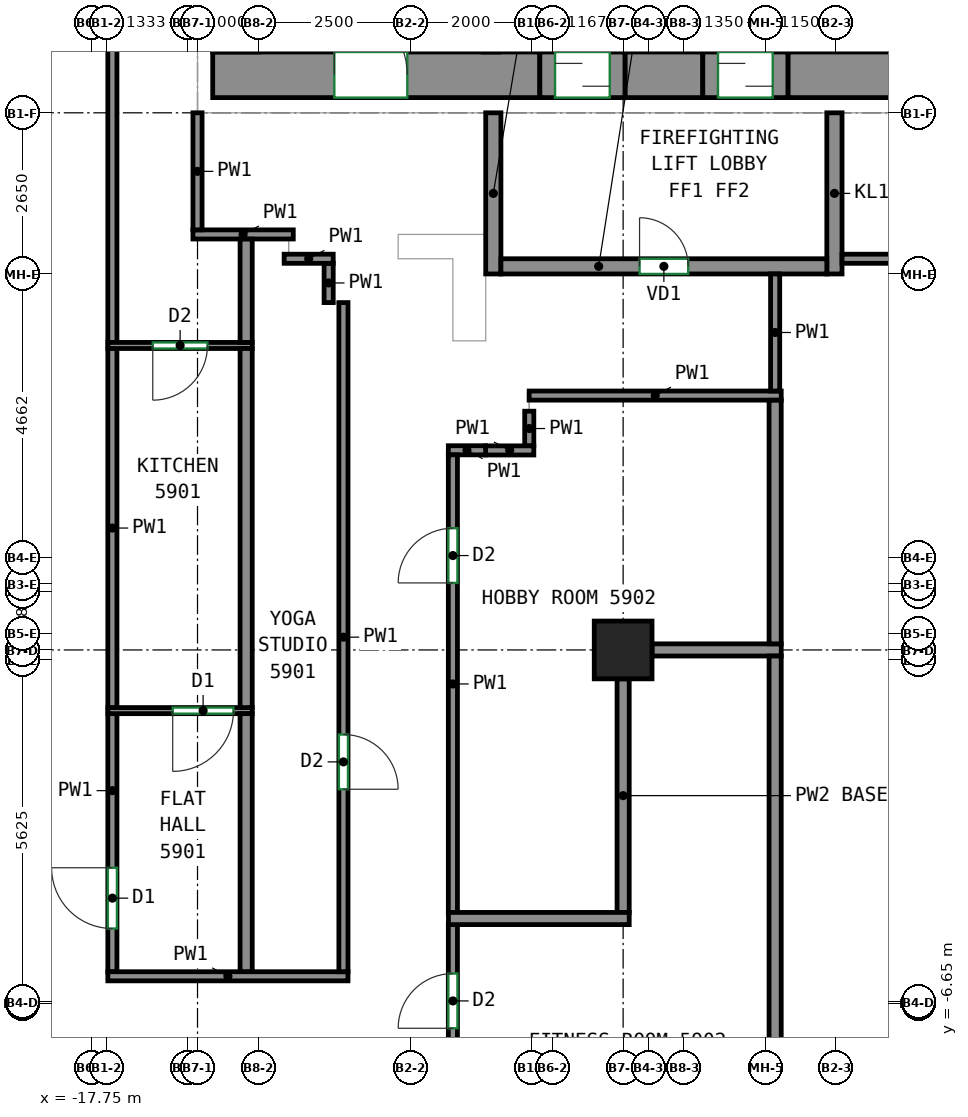
"""IFC4 building model, lengths in metres.
Left out: names, types, materials, properties, quantities, classifications, styles, units other than length and angle.
Written with IfcOpenShell. Run it as: python <this file> out.ifc"""

import sys

from ifc_helpers import new_model, si_unit, direction, frame, frame_2d, origin, origin_2d, place, context, subcontext, project, spatial, rectangle, extrude, source, transform, mapped, element, fill, save


model = new_model("IFC4")
c1 = context("Model", 3, precision=1e-05, world=origin(), true_north=direction((0.0, 1.0)))
c2 = subcontext(c1, "Body", "Model", "MODEL_VIEW")
j1 = project(units=[si_unit("LENGTHUNIT", "METRE"), si_unit("PLANEANGLEUNIT", "RADIAN")], contexts=[c1])
p1 = place(None, origin())
s1 = spatial("IfcSite", under=j1, at=p1, CompositionType="ELEMENT")
p2 = place(p1, origin())
s2 = spatial("IfcBuilding", under=s1, at=p2, CompositionType="ELEMENT")
p3 = place(p2, frame((0.0, 0.0, 245.8)))
s3 = spatial("IfcBuildingStorey", under=s2, at=p3, CompositionType="ELEMENT", Elevation=245.8)
m1 = source(origin(), c2, "Body", "SweptSolid", [
    extrude(rectangle(XDim=0.95, YDim=0.95, at=origin_2d()), origin(), (0.0, 0.0, 1.0), 3.12),
])
p4 = place(p3, frame((-9.0, -0.833, 0.0), z_axis=(0.0, 0.0, 1.0), x_axis=(1.0, 0.0, 0.0)))
e1 = element("IfcColumn", 1, at=p4, inside=s3, PredefinedType="COLUMN", context=c2, shape_type="MappedRepresentation", body=[
    mapped(m1, transform((0.0, 0.0, 0.0))),
])
m2 = source(origin(), c2, "Body", "SweptSolid", [
    extrude(rectangle(XDim=5.38, YDim=0.75, at=frame_2d((2.69, 0.0))), origin(), (0.0, 0.0, 1.0), 3.12),
])
p5 = place(p3, frame((-15.75, 8.625, 0.0), z_axis=(0.0, 0.0, 1.0), x_axis=(1.0, 0.0, 0.0)))
e2 = element("IfcWall", 2, at=p5, inside=s3, PredefinedType="SHEAR", context=c2, shape_type="MappedRepresentation", body=[
    mapped(m2, transform((0.0, 0.0, 0.0))),
])
p6 = place(p5, frame((2.0, 0.0, 0.0)))
e3 = element("IfcOpeningElement", 3, at=p6, cuts=e2, PredefinedType="OPENING", context=c2, shape_type="SweptSolid", body=[
    extrude(rectangle(XDim=1.2, YDim=2.1, at=frame_2d((0.6, 1.05))), frame((0.0, 0.385, 0.0), z_axis=(0.0, -1.0, 0.0), x_axis=(1.0, 0.0, 0.0)), (0.0, 0.0, 1.0), 0.77),
])
m3 = source(origin(), c2, "Body", "SweptSolid", [
    extrude(rectangle(XDim=1.28, YDim=0.75, at=frame_2d((0.64, 0.0))), origin(), (0.0, 0.0, 1.0), 3.12),
])
p7 = place(p3, frame((-8.97, 8.625, 0.0), z_axis=(0.0, 0.0, 1.0), x_axis=(1.0, 0.0, 0.0)))
e4 = element("IfcWall", 4, at=p7, inside=s3, PredefinedType="SHEAR", context=c2, shape_type="MappedRepresentation", body=[
    mapped(m3, transform((0.0, 0.0, 0.0))),
])
m4 = source(origin(), c2, "Body", "SweptSolid", [
    extrude(rectangle(XDim=14.18, YDim=0.75, at=frame_2d((7.09, 0.0))), origin(), (0.0, 0.0, 1.0), 3.12),
])
p8 = place(p3, frame((-6.29, 8.625, 0.0), z_axis=(0.0, 0.0, 1.0), x_axis=(1.0, 0.0, 0.0)))
e5 = element("IfcWall", 5, at=p8, inside=s3, PredefinedType="SHEAR", context=c2, shape_type="MappedRepresentation", body=[
    mapped(m4, transform((0.0, 0.0, 0.0))),
])
m5 = source(origin(), c2, "Body", "SweptSolid", [
    extrude(rectangle(XDim=2.65, YDim=0.25, at=frame_2d((1.325, 0.0))), origin(), (0.0, 0.0, 1.0), 2.57),
])
for number, where, z_axis, x_axis in (
    (6, (-11.135, 5.35, 0.0), (0.0, 0.0, 1.0), (0.0, 1.0, 0.0)),
    (7, (-5.525, 5.35, 0.0), (0.0, 0.0, 1.0), (0.0, 1.0, 0.0)),
):
    element("IfcWall", number, at=place(p3, frame(where, z_axis=z_axis, x_axis=x_axis)), inside=s3, PredefinedType="PARTITIONING", context=c2, shape_type="MappedRepresentation", body=[
        mapped(m5, transform((0.0, 0.0, 0.0))),
    ])
m6 = source(origin(), c2, "Body", "SweptSolid", [
    extrude(rectangle(XDim=5.36, YDim=0.25, at=frame_2d((2.68, 0.0))), origin(), (0.0, 0.0, 1.0), 3.12),
])
p9 = place(p3, frame((-11.01, 5.475, 0.0), z_axis=(0.0, 0.0, 1.0), x_axis=(1.0, 0.0, 0.0)))
e8 = element("IfcWall", 8, at=p9, inside=s3, PredefinedType="PARTITIONING", context=c2, shape_type="MappedRepresentation", body=[
    mapped(m6, transform((0.0, 0.0, 0.0))),
])
p10 = place(p9, frame((2.28, 0.0, 0.0)))
e9 = element("IfcOpeningElement", 9, at=p10, cuts=e8, PredefinedType="OPENING", context=c2, shape_type="SweptSolid", body=[
    extrude(rectangle(XDim=0.8, YDim=2.0, at=frame_2d((0.4, 1.0))), frame((0.0, 0.135, 0.0), z_axis=(0.0, -1.0, 0.0), x_axis=(1.0, 0.0, 0.0)), (0.0, 0.0, 1.0), 0.27),
])
m7 = source(origin(), c2, "Body", "SweptSolid", [
    extrude(rectangle(XDim=1.4, YDim=0.75, at=frame_2d((0.7, 0.0))), origin(), (0.0, 0.0, 1.0), 2.7),
])
p11 = place(p3, frame((-10.37, 8.625, 0.0), z_axis=(0.0, 0.0, 1.0), x_axis=(1.0, 0.0, 0.0)))
e10 = element("IfcWall", 10, at=p11, inside=s3, PredefinedType="PARTITIONING", context=c2, shape_type="MappedRepresentation", body=[
    mapped(m7, transform((0.0, 0.0, 0.0))),
])
p12 = place(p11, frame((0.25, 0.0, 0.0)))
e11 = element("IfcOpeningElement", 11, at=p12, cuts=e10, PredefinedType="OPENING", context=c2, shape_type="SweptSolid", body=[
    extrude(rectangle(XDim=0.9, YDim=2.1, at=frame_2d((0.45, 1.05))), frame((0.0, 0.385, 0.0), z_axis=(0.0, -1.0, 0.0), x_axis=(1.0, 0.0, 0.0)), (0.0, 0.0, 1.0), 0.77),
])
m8 = source(origin(), c2, "Body", "SweptSolid", [
    extrude(rectangle(XDim=1.4, YDim=0.75, at=frame_2d((0.7, 0.0))), origin(), (0.0, 0.0, 1.0), 2.7),
])
p13 = place(p3, frame((-7.69, 8.625, 0.0), z_axis=(0.0, 0.0, 1.0), x_axis=(1.0, 0.0, 0.0)))
e12 = element("IfcWall", 12, at=p13, inside=s3, PredefinedType="PARTITIONING", context=c2, shape_type="MappedRepresentation", body=[
    mapped(m8, transform((0.0, 0.0, 0.0))),
])
p14 = place(p13, frame((0.25, 0.0, 0.0)))
e13 = element("IfcOpeningElement", 13, at=p14, cuts=e12, PredefinedType="OPENING", context=c2, shape_type="SweptSolid", body=[
    extrude(rectangle(XDim=0.9, YDim=2.1, at=frame_2d((0.45, 1.05))), frame((0.0, 0.385, 0.0), z_axis=(0.0, -1.0, 0.0), x_axis=(1.0, 0.0, 0.0)), (0.0, 0.0, 1.0), 0.77),
])
p15 = place(p3, frame((-17.4, -6.125, 0.0), z_axis=(0.0, 0.0, 1.0), x_axis=(0.0, 1.0, 0.0)))
e14 = element("IfcWall", 14, at=p15, inside=s3, PredefinedType="PARTITIONING", context=c2, shape_type="SweptSolid", body=[
    extrude(rectangle(XDim=4.254, YDim=0.15, at=frame_2d((2.127, 0.0))), origin(), (0.0, 0.0, 1.0), 3.12),
])
p16 = place(p15, frame((0.71, 0.0, 0.0)))
e15 = element("IfcOpeningElement", 15, at=p16, cuts=e14, PredefinedType="OPENING", context=c2, shape_type="SweptSolid", body=[
    extrude(rectangle(XDim=1.0, YDim=2.1, at=frame_2d((0.5, 1.05))), frame((0.0, 0.085, 0.0), z_axis=(0.0, -1.0, 0.0), x_axis=(1.0, 0.0, 0.0)), (0.0, 0.0, 1.0), 0.17),
])
p17 = place(p3, frame((-17.475, -6.2, 0.0), z_axis=(0.0, 0.0, 1.0), x_axis=(1.0, 0.0, 0.0)))
e16 = element("IfcWall", 16, at=p17, inside=s3, PredefinedType="PARTITIONING", context=c2, shape_type="SweptSolid", body=[
    extrude(rectangle(XDim=3.95, YDim=0.15, at=frame_2d((1.975, 0.0))), origin(), (0.0, 0.0, 1.0), 3.12),
])
p18 = place(p3, frame((-17.4, -1.791, 0.0), z_axis=(0.0, 0.0, 1.0), x_axis=(0.0, 1.0, 0.0)))
e17 = element("IfcWall", 17, at=p18, inside=s3, PredefinedType="PARTITIONING", context=c2, shape_type="SweptSolid", body=[
    extrude(rectangle(XDim=5.925, YDim=0.15, at=frame_2d((2.962, 0.0))), origin(), (0.0, 0.0, 1.0), 3.12),
])
p19 = place(p3, frame((-17.4, 4.214, 0.0), z_axis=(0.0, 0.0, 1.0), x_axis=(0.0, 1.0, 0.0)))
e18 = element("IfcWall", 18, at=p19, inside=s3, PredefinedType="PARTITIONING", context=c2, shape_type="SweptSolid", body=[
    extrude(rectangle(XDim=12.477, YDim=0.15, at=frame_2d((6.238, 0.0))), origin(), (0.0, 0.0, 1.0), 3.12),
])
p20 = place(p3, frame((-16.075, 6.0, 0.0), z_axis=(0.0, 0.0, 1.0), x_axis=(1.0, 0.0, 0.0)))
e19 = element("IfcWall", 19, at=p20, inside=s3, PredefinedType="PARTITIONING", context=c2, shape_type="SweptSolid", body=[
    extrude(rectangle(XDim=1.65, YDim=0.15, at=frame_2d((0.825, 0.0))), origin(), (0.0, 0.0, 1.0), 3.12),
])
p21 = place(p3, frame((-16.0, 6.075, 0.0), z_axis=(0.0, 0.0, 1.0), x_axis=(0.0, 1.0, 0.0)))
e20 = element("IfcWall", 20, at=p21, inside=s3, PredefinedType="PARTITIONING", context=c2, shape_type="SweptSolid", body=[
    extrude(rectangle(XDim=1.925, YDim=0.15, at=frame_2d((0.962, 0.0))), origin(), (0.0, 0.0, 1.0), 3.12),
])
p22 = place(p3, frame((-13.6, 4.879, 0.0), z_axis=(0.0, 0.0, 1.0), x_axis=(0.0, -1.0, 0.0)))
e21 = element("IfcWall", 21, at=p22, inside=s3, PredefinedType="PARTITIONING", context=c2, shape_type="SweptSolid", body=[
    extrude(rectangle(XDim=11.004, YDim=0.15, at=frame_2d((5.502, 0.0))), origin(), (0.0, 0.0, 1.0), 3.12),
])
p23 = place(p22, frame((7.103, 0.0, 0.0)))
e22 = element("IfcOpeningElement", 22, at=p23, cuts=e21, PredefinedType="OPENING", context=c2, shape_type="SweptSolid", body=[
    extrude(rectangle(XDim=0.9, YDim=2.1, at=frame_2d((0.45, 1.05))), frame((0.0, 0.085, 0.0), z_axis=(0.0, -1.0, 0.0), x_axis=(1.0, 0.0, 0.0)), (0.0, 0.0, 1.0), 0.17),
])
p24 = place(p3, frame((-13.843, 5.525, 0.0), z_axis=(0.0, 0.0, 1.0), x_axis=(0.0, -1.0, 0.0)))
e23 = element("IfcWall", 23, at=p24, inside=s3, PredefinedType="PARTITIONING", context=c2, shape_type="SweptSolid", body=[
    extrude(rectangle(XDim=0.646, YDim=0.15, at=frame_2d((0.323, 0.0))), origin(), (0.0, 0.0, 1.0), 3.12),
])
p25 = place(p3, frame((-14.575, 5.6, 0.0), z_axis=(0.0, 0.0, 1.0), x_axis=(1.0, 0.0, 0.0)))
e24 = element("IfcWall", 24, at=p25, inside=s3, PredefinedType="PARTITIONING", context=c2, shape_type="SweptSolid", body=[
    extrude(rectangle(XDim=0.807, YDim=0.15, at=frame_2d((0.403, 0.0))), origin(), (0.0, 0.0, 1.0), 3.12),
])
p26 = place(p3, frame((-10.546, 3.35, 0.0), z_axis=(0.0, 0.0, 1.0), x_axis=(1.0, 0.0, 0.0)))
e25 = element("IfcWall", 25, at=p26, inside=s3, PredefinedType="PARTITIONING", context=c2, shape_type="SweptSolid", body=[
    extrude(rectangle(XDim=4.146, YDim=0.15, at=frame_2d((2.073, 0.0))), origin(), (0.0, 0.0, 1.0), 3.12),
])
p27 = place(p3, frame((-10.544, 2.523, 0.0), z_axis=(0.0, 0.0, 1.0), x_axis=(0.0, 1.0, 0.0)))
e26 = element("IfcWall", 26, at=p27, inside=s3, PredefinedType="PARTITIONING", context=c2, shape_type="SweptSolid", body=[
    extrude(rectangle(XDim=0.57, YDim=0.15, at=frame_2d((0.285, 0.0))), origin(), (0.0, 0.0, 1.0), 3.12),
])
p28 = place(p3, frame((-11.262, 2.448, 0.0), z_axis=(0.0, 0.0, 1.0), x_axis=(1.0, 0.0, 0.0)))
e27 = element("IfcWall", 27, at=p28, inside=s3, PredefinedType="PARTITIONING", context=c2, shape_type="SweptSolid", body=[
    extrude(rectangle(XDim=0.793, YDim=0.15, at=frame_2d((0.396, 0.0))), origin(), (0.0, 0.0, 1.0), 3.12),
])
p29 = place(p3, frame((-11.875, 2.45, 0.0), z_axis=(0.0, 0.0, 1.0), x_axis=(1.0, 0.0, 0.0)))
e28 = element("IfcWall", 28, at=p29, inside=s3, PredefinedType="PARTITIONING", context=c2, shape_type="SweptSolid", body=[
    extrude(rectangle(XDim=0.613, YDim=0.15, at=frame_2d((0.307, 0.0))), origin(), (0.0, 0.0, 1.0), 3.12),
])
p30 = place(p3, frame((-11.8, -5.16, 0.0), z_axis=(0.0, 0.0, 1.0), x_axis=(0.0, 1.0, 0.0)))
e29 = element("IfcWall", 29, at=p30, inside=s3, PredefinedType="PARTITIONING", context=c2, shape_type="SweptSolid", body=[
    extrude(rectangle(XDim=7.535, YDim=0.15, at=frame_2d((3.768, 0.0))), origin(), (0.0, 0.0, 1.0), 3.12),
])
p31 = place(p30, frame((5.429, 0.0, 0.0)))
e30 = element("IfcOpeningElement", 30, at=p31, cuts=e29, PredefinedType="OPENING", context=c2, shape_type="SweptSolid", body=[
    extrude(rectangle(XDim=0.9, YDim=2.1, at=frame_2d((0.45, 1.05))), frame((0.0, 0.085, 0.0), z_axis=(0.0, -1.0, 0.0), x_axis=(1.0, 0.0, 0.0)), (0.0, 0.0, 1.0), 0.17),
])
p32 = place(p3, frame((-11.8, -10.125, 0.0), z_axis=(0.0, 0.0, 1.0), x_axis=(0.0, 1.0, 0.0)))
e31 = element("IfcWall", 31, at=p32, inside=s3, PredefinedType="PARTITIONING", context=c2, shape_type="SweptSolid", body=[
    extrude(rectangle(XDim=4.785, YDim=0.15, at=frame_2d((2.393, 0.0))), origin(), (0.0, 0.0, 1.0), 3.12),
])
p33 = place(p32, frame((3.07, 0.0, 0.0)))
e32 = element("IfcOpeningElement", 32, at=p33, cuts=e31, PredefinedType="OPENING", context=c2, shape_type="SweptSolid", body=[
    extrude(rectangle(XDim=0.9, YDim=2.1, at=frame_2d((0.45, 1.05))), frame((0.0, 0.085, 0.0), z_axis=(0.0, -1.0, 0.0), x_axis=(1.0, 0.0, 0.0)), (0.0, 0.0, 1.0), 0.17),
])
p34 = place(p3, frame((-6.5, 3.425, 0.0), z_axis=(0.0, 0.0, 1.0), x_axis=(0.0, 1.0, 0.0)))
e33 = element("IfcWall", 33, at=p34, inside=s3, PredefinedType="PARTITIONING", context=c2, shape_type="SweptSolid", body=[
    extrude(rectangle(XDim=1.925, YDim=0.15, at=frame_2d((0.962, 0.0))), origin(), (0.0, 0.0, 1.0), 3.12),
])
p35 = place(p3, frame((-5.4, 5.6, 0.0), z_axis=(0.0, 0.0, 1.0), x_axis=(1.0, 0.0, 0.0)))
e34 = element("IfcWall", 34, at=p35, inside=s3, PredefinedType="PARTITIONING", context=c2, shape_type="SweptSolid", body=[
    extrude(rectangle(XDim=13.975, YDim=0.15, at=frame_2d((6.987, 0.0))), origin(), (0.0, 0.0, 1.0), 3.12),
])
p36 = place(p3, frame((-15.1, -1.831, 0.0), z_axis=(0.0, 0.0, 1.0), x_axis=(-1.0, 0.0, 0.0)))
e35 = element("IfcWall", 35, at=p36, inside=s3, PredefinedType="PARTITIONING", context=c2, shape_type="SweptSolid", body=[
    extrude(rectangle(XDim=2.373, YDim=0.1, at=frame_2d((1.187, 0.0))), origin(), (0.0, 0.0, 1.0), 3.12),
])
p37 = place(p36, frame((0.308, 0.0, 0.0)))
e36 = element("IfcOpeningElement", 36, at=p37, cuts=e35, PredefinedType="OPENING", context=c2, shape_type="SweptSolid", body=[
    extrude(rectangle(XDim=1.0, YDim=2.1, at=frame_2d((0.5, 1.05))), frame((0.0, 0.06, 0.0), z_axis=(0.0, -1.0, 0.0), x_axis=(1.0, 0.0, 0.0)), (0.0, 0.0, 1.0), 0.12),
])
p38 = place(p3, frame((-15.2, -6.123, 0.0), z_axis=(0.0, 0.0, 1.0), x_axis=(0.0, 1.0, 0.0)))
e37 = element("IfcWall", 37, at=p38, inside=s3, PredefinedType="PARTITIONING", context=c2, shape_type="SweptSolid", body=[
    extrude(rectangle(XDim=4.242, YDim=0.2, at=frame_2d((2.121, 0.0))), origin(), (0.0, 0.0, 1.0), 3.12),
])
p39 = place(p3, frame((-15.1, 4.174, 0.0), z_axis=(0.0, 0.0, 1.0), x_axis=(-1.0, 0.0, 0.0)))
e38 = element("IfcWall", 38, at=p39, inside=s3, PredefinedType="PARTITIONING", context=c2, shape_type="SweptSolid", body=[
    extrude(rectangle(XDim=2.373, YDim=0.1, at=frame_2d((1.187, 0.0))), origin(), (0.0, 0.0, 1.0), 3.12),
])
p40 = place(p39, frame((0.736, 0.0, 0.0)))
e39 = element("IfcOpeningElement", 39, at=p40, cuts=e38, PredefinedType="OPENING", context=c2, shape_type="SweptSolid", body=[
    extrude(rectangle(XDim=0.9, YDim=2.1, at=frame_2d((0.45, 1.05))), frame((0.0, 0.06, 0.0), z_axis=(0.0, -1.0, 0.0), x_axis=(1.0, 0.0, 0.0)), (0.0, 0.0, 1.0), 0.12),
])
p41 = place(p3, frame((-15.2, -1.781, 0.0), z_axis=(0.0, 0.0, 1.0), x_axis=(0.0, 1.0, 0.0)))
e40 = element("IfcWall", 40, at=p41, inside=s3, PredefinedType="PARTITIONING", context=c2, shape_type="SweptSolid", body=[
    extrude(rectangle(XDim=5.905, YDim=0.2, at=frame_2d((2.953, 0.0))), origin(), (0.0, 0.0, 1.0), 3.12),
])
p42 = place(p3, frame((-15.2, 4.224, 0.0), z_axis=(0.0, 0.0, 1.0), x_axis=(0.0, 1.0, 0.0)))
e41 = element("IfcWall", 41, at=p42, inside=s3, PredefinedType="PARTITIONING", context=c2, shape_type="SweptSolid", body=[
    extrude(rectangle(XDim=1.699, YDim=0.2, at=frame_2d((0.85, 0.0))), origin(), (0.0, 0.0, 1.0), 3.12),
])
p43 = place(p3, frame((-8.525, -0.833, 0.0), z_axis=(0.0, 0.0, 1.0), x_axis=(1.0, 0.0, 0.0)))
e42 = element("IfcWall", 42, at=p43, inside=s3, PredefinedType="PARTITIONING", context=c2, shape_type="SweptSolid", body=[
    extrude(rectangle(XDim=2.125, YDim=0.2, at=frame_2d((1.062, 0.0))), origin(), (0.0, 0.0, 1.0), 3.12),
])
p44 = place(p3, frame((-9.0, -5.15, 0.0), z_axis=(0.0, 0.0, 1.0), x_axis=(0.0, 1.0, 0.0)))
e43 = element("IfcWall", 43, at=p44, inside=s3, PredefinedType="PARTITIONING", context=c2, shape_type="SweptSolid", body=[
    extrude(rectangle(XDim=3.842, YDim=0.2, at=frame_2d((1.921, 0.0))), origin(), (0.0, 0.0, 1.0), 2.57),
])
p45 = place(p3, frame((-11.873, -5.25, 0.0), z_axis=(0.0, 0.0, 1.0), x_axis=(1.0, 0.0, 0.0)))
e44 = element("IfcWall", 44, at=p45, inside=s3, PredefinedType="PARTITIONING", context=c2, shape_type="SweptSolid", body=[
    extrude(rectangle(XDim=2.973, YDim=0.2, at=frame_2d((1.487, 0.0))), origin(), (0.0, 0.0, 1.0), 3.12),
])
p46 = place(p3, frame((-6.5, -0.733, 0.0), z_axis=(0.0, 0.0, 1.0), x_axis=(0.0, 1.0, 0.0)))
e45 = element("IfcWall", 45, at=p46, inside=s3, PredefinedType="PARTITIONING", context=c2, shape_type="SweptSolid", body=[
    extrude(rectangle(XDim=4.006, YDim=0.2, at=frame_2d((2.003, 0.0))), origin(), (0.0, 0.0, 1.0), 3.12),
])
p47 = place(p3, frame((-6.5, -9.323, 0.0), z_axis=(0.0, 0.0, 1.0), x_axis=(0.0, 1.0, 0.0)))
e46 = element("IfcWall", 46, at=p47, inside=s3, PredefinedType="PARTITIONING", context=c2, shape_type="SweptSolid", body=[
    extrude(rectangle(XDim=8.39, YDim=0.2, at=frame_2d((4.195, 0.0))), origin(), (0.0, 0.0, 1.0), 3.12),
])
p48 = place(p10, origin())
e47 = element("IfcDoor", 47, at=p48, inside=s3, OperationType="SINGLE_SWING_LEFT", PredefinedType="DOOR", context=c2, shape_type="SweptSolid", body=[
    extrude(rectangle(XDim=0.8, YDim=2.0, at=frame_2d((0.4, 1.0))), frame((0.0, 0.025, 0.0), z_axis=(0.0, -1.0, 0.0), x_axis=(1.0, 0.0, 0.0)), (0.0, 0.0, 1.0), 0.05),
])
fill(e9, e47)
p49 = place(p12, origin())
e48 = element("IfcDoor", 48, at=p49, inside=s3, OperationType="SLIDING_TO_LEFT", PredefinedType="DOOR", context=c2, shape_type="SweptSolid", body=[
    extrude(rectangle(XDim=0.9, YDim=2.1, at=frame_2d((0.45, 1.05))), frame((0.0, 0.28, 0.0), z_axis=(0.0, -1.0, 0.0), x_axis=(1.0, 0.0, 0.0)), (0.0, 0.0, 1.0), 0.05),
])
fill(e11, e48)
p50 = place(p14, origin())
e49 = element("IfcDoor", 49, at=p50, inside=s3, OperationType="SLIDING_TO_RIGHT", PredefinedType="DOOR", context=c2, shape_type="SweptSolid", body=[
    extrude(rectangle(XDim=0.9, YDim=2.1, at=frame_2d((0.45, 1.05))), frame((0.0, 0.28, 0.0), z_axis=(0.0, -1.0, 0.0), x_axis=(1.0, 0.0, 0.0)), (0.0, 0.0, 1.0), 0.05),
])
fill(e13, e49)
p51 = place(p6, origin())
e50 = element("IfcDoor", 50, at=p51, inside=s3, OperationType="DOUBLE_DOOR_SINGLE_SWING", PredefinedType="DOOR", context=c2, shape_type="SweptSolid", body=[
    extrude(rectangle(XDim=1.2, YDim=2.1, at=frame_2d((0.6, 1.05))), frame((0.0, 0.28, 0.0), z_axis=(0.0, -1.0, 0.0), x_axis=(1.0, 0.0, 0.0)), (0.0, 0.0, 1.0), 0.05),
])
fill(e3, e50)
p52 = place(p33, origin())
e51 = element("IfcDoor", 51, at=p52, inside=s3, OperationType="SINGLE_SWING_LEFT", PredefinedType="DOOR", context=c2, shape_type="SweptSolid", body=[
    extrude(rectangle(XDim=0.9, YDim=2.1, at=frame_2d((0.45, 1.05))), frame((0.0, 0.025, 0.0), z_axis=(0.0, -1.0, 0.0), x_axis=(1.0, 0.0, 0.0)), (0.0, 0.0, 1.0), 0.05),
])
fill(e32, e51)
p53 = place(p16, origin())
e52 = element("IfcDoor", 52, at=p53, inside=s3, OperationType="SINGLE_SWING_RIGHT", PredefinedType="DOOR", context=c2, shape_type="SweptSolid", body=[
    extrude(rectangle(XDim=1.0, YDim=2.1, at=frame_2d((0.5, 1.05))), frame((0.0, 0.025, 0.0), z_axis=(0.0, -1.0, 0.0), x_axis=(1.0, 0.0, 0.0)), (0.0, 0.0, 1.0), 0.05),
])
fill(e15, e52)
p54 = place(p23, origin())
e53 = element("IfcDoor", 53, at=p54, inside=s3, OperationType="SINGLE_SWING_RIGHT", PredefinedType="DOOR", context=c2, shape_type="SweptSolid", body=[
    extrude(rectangle(XDim=0.9, YDim=2.1, at=frame_2d((0.45, 1.05))), frame((0.0, 0.025, 0.0), z_axis=(0.0, -1.0, 0.0), x_axis=(1.0, 0.0, 0.0)), (0.0, 0.0, 1.0), 0.05),
])
fill(e22, e53)
p55 = place(p37, origin())
e54 = element("IfcDoor", 54, at=p55, inside=s3, OperationType="SINGLE_SWING_RIGHT", PredefinedType="DOOR", context=c2, shape_type="SweptSolid", body=[
    extrude(rectangle(XDim=1.0, YDim=2.1, at=frame_2d((0.5, 1.05))), frame((0.0, 0.025, 0.0), z_axis=(0.0, -1.0, 0.0), x_axis=(1.0, 0.0, 0.0)), (0.0, 0.0, 1.0), 0.05),
])
fill(e36, e54)
p56 = place(p31, origin())
e55 = element("IfcDoor", 55, at=p56, inside=s3, OperationType="SINGLE_SWING_LEFT", PredefinedType="DOOR", context=c2, shape_type="SweptSolid", body=[
    extrude(rectangle(XDim=0.9, YDim=2.1, at=frame_2d((0.45, 1.05))), frame((0.0, 0.025, 0.0), z_axis=(0.0, -1.0, 0.0), x_axis=(1.0, 0.0, 0.0)), (0.0, 0.0, 1.0), 0.05),
])
fill(e30, e55)
p57 = place(p40, origin())
e56 = element("IfcDoor", 56, at=p57, inside=s3, OperationType="SINGLE_SWING_RIGHT", PredefinedType="DOOR", context=c2, shape_type="SweptSolid", body=[
    extrude(rectangle(XDim=0.9, YDim=2.1, at=frame_2d((0.45, 1.05))), frame((0.0, 0.025, 0.0), z_axis=(0.0, -1.0, 0.0), x_axis=(1.0, 0.0, 0.0)), (0.0, 0.0, 1.0), 0.05),
])
fill(e39, e56)
save(model, sys.argv[1])
